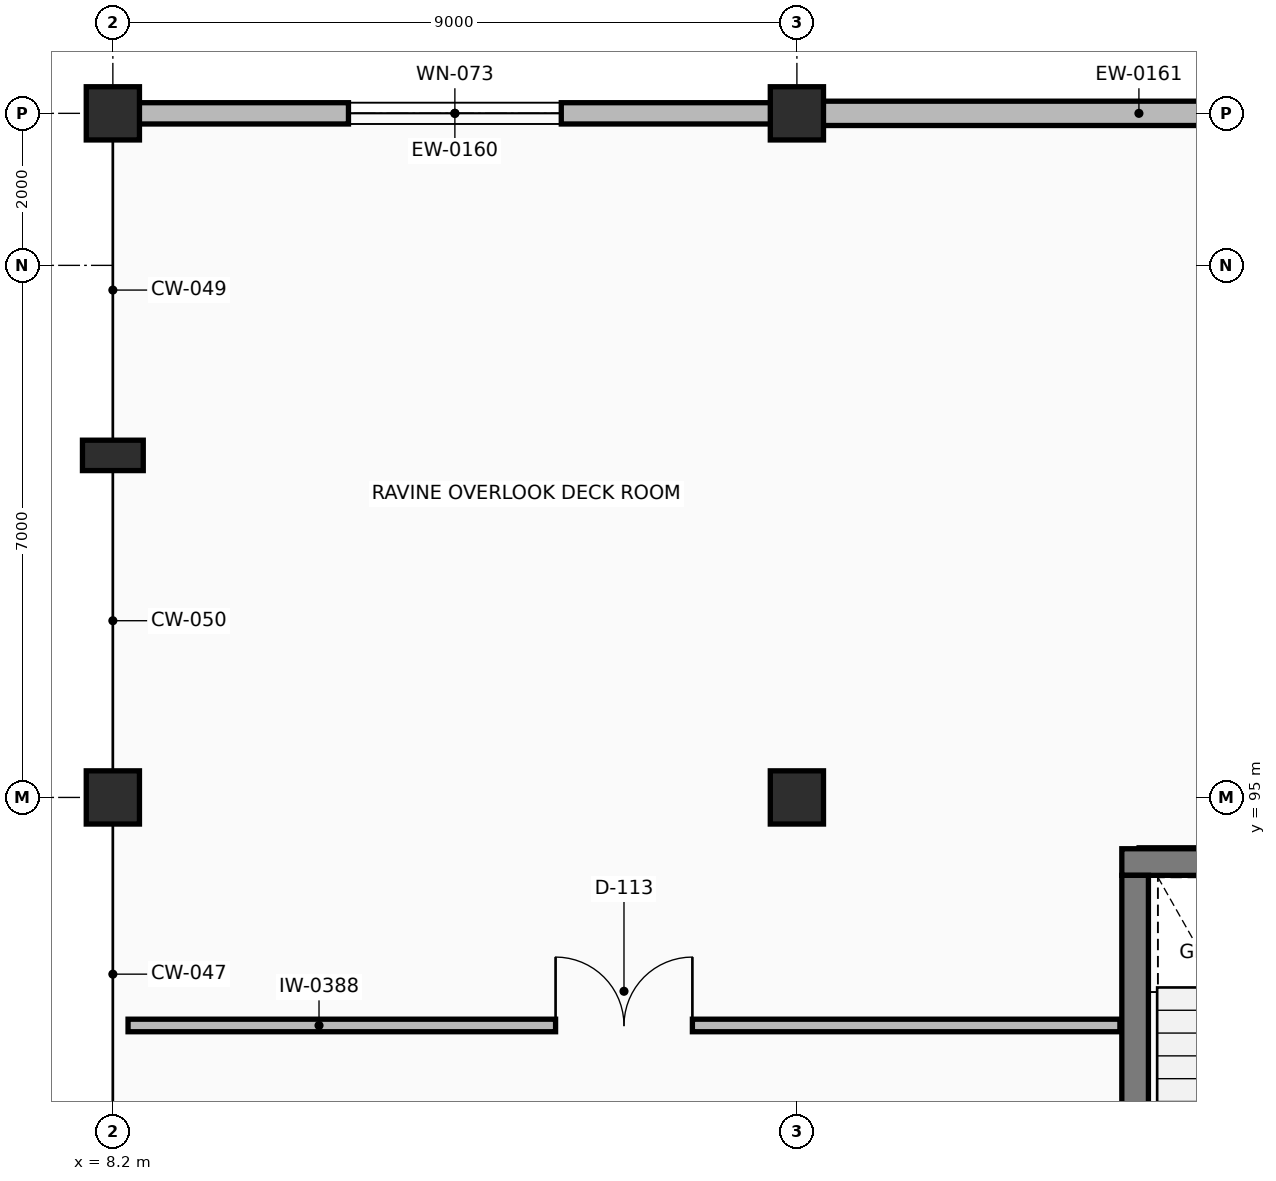
"""IFC4 building model, lengths in metres.
Left out: names, types, materials, properties, quantities, classifications, styles, units other than length and angle.
Written with IfcOpenShell. Run it as: python <this file> out.ifc"""

import sys

from ifc_helpers import new_model, si_unit, direction, frame, frame_2d, origin, origin_2d, place, context, subcontext, project, spatial, rectangle, extrude, element, fill, save


model = new_model("IFC4")
c1 = context("Model", 3, precision=1e-05, world=origin(), true_north=direction((0.0, 1.0)))
c2 = subcontext(c1, "Body", "Model", "MODEL_VIEW")
j1 = project(units=[si_unit("LENGTHUNIT", "METRE"), si_unit("PLANEANGLEUNIT", "RADIAN")], contexts=[c1])
p1 = place(None, origin())
s1 = spatial("IfcSite", under=j1, at=p1, CompositionType="ELEMENT")
p2 = place(p1, origin())
s2 = spatial("IfcBuilding", under=s1, at=p2, CompositionType="ELEMENT")
p3 = place(p2, frame((0.0, 0.0, 9.6)))
s3 = spatial("IfcBuildingStorey", under=s2, at=p3, CompositionType="ELEMENT", Elevation=9.6)
for number, where, z_axis, x_axis in (
    (1, (8.2, 95.0, 0.0), (0.0, 0.0, 1.0), (1.0, 0.0, 0.0)),
    (2, (8.2, 104.0, 0.0), (0.0, 0.0, 1.0), (1.0, 0.0, 0.0)),
    (3, (17.2, 95.0, 0.0), (0.0, 0.0, 1.0), (1.0, 0.0, 0.0)),
    (4, (17.2, 104.0, 0.0), (0.0, 0.0, 1.0), (1.0, 0.0, 0.0)),
):
    element("IfcColumn", number, at=place(p3, frame(where, z_axis=z_axis, x_axis=x_axis)), inside=s3, PredefinedType="COLUMN", context=c2, shape_type="SweptSolid", body=[
        extrude(rectangle(XDim=0.7, YDim=0.7, at=origin_2d()), origin(), (0.0, 0.0, 1.0), 4.8),
    ])
p4 = place(p3, frame((8.2, 99.5, 0.0), z_axis=(0.0, 0.0, 1.0), x_axis=(0.0, 1.0, 0.0)))
e5 = element("IfcColumn", 5, at=p4, inside=s3, PredefinedType="PILASTER", context=c2, shape_type="SweptSolid", body=[
    extrude(rectangle(XDim=0.4, YDim=0.8, at=origin_2d()), origin(), (0.0, 0.0, 1.0), 4.8),
])
p5 = place(p3, frame((16.855, 104.0, 0.0), z_axis=(0.0, 0.0, 1.0), x_axis=(-1.0, 0.0, 0.0)))
e6 = element("IfcWall", 6, at=p5, inside=s3, PredefinedType="SOLIDWALL", context=c2, shape_type="SweptSolid", body=[
    extrude(rectangle(XDim=8.31, YDim=0.28, at=frame_2d((4.155, 0.0))), origin(), (0.0, 0.0, 1.0), 3.614),
])
p6 = place(p5, frame((2.755, 0.0, 0.9)))
e7 = element("IfcOpeningElement", 7, at=p6, cuts=e6, PredefinedType="OPENING", context=c2, shape_type="SweptSolid", body=[
    extrude(rectangle(XDim=2.8, YDim=1.4, at=frame_2d((1.4, 0.7))), frame((0.0, 0.15, 0.0), z_axis=(0.0, -1.0, 0.0), x_axis=(1.0, 0.0, 0.0)), (0.0, 0.0, 1.0), 0.3),
])
p7 = place(p3, frame((25.855, 104.0, 0.0), z_axis=(0.0, 0.0, 1.0), x_axis=(-1.0, 0.0, 0.0)))
e8 = element("IfcWall", 8, at=p7, inside=s3, PredefinedType="SOLIDWALL", context=c2, shape_type="SweptSolid", body=[
    extrude(rectangle(XDim=8.31, YDim=0.32, at=frame_2d((4.155, 0.0))), origin(), (0.0, 0.0, 1.0), 3.614),
])
p8 = place(p3, frame((25.725, 94.15, 0.0), z_axis=(0.0, 0.0, 1.0), x_axis=(-1.0, 0.0, 0.0)))
e9 = element("IfcWall", 9, at=p8, inside=s3, PredefinedType="SHEAR", context=c2, shape_type="SweptSolid", body=[
    extrude(rectangle(XDim=4.25, YDim=0.35, at=frame_2d((2.125, 0.0))), origin(), (0.0, 0.0, 1.0), 4.49),
])
p9 = place(p3, frame((21.65, 93.975, 0.0), z_axis=(0.0, 0.0, 1.0), x_axis=(0.0, -1.0, 0.0)))
e10 = element("IfcWall", 10, at=p9, inside=s3, PredefinedType="SHEAR", context=c2, shape_type="SweptSolid", body=[
    extrude(rectangle(XDim=7.55, YDim=0.35, at=frame_2d((3.775, 0.0))), origin(), (0.0, 0.0, 1.0), 4.49),
])
p10 = place(p9, frame((6.0, 0.0, 0.0)))
e11 = element("IfcOpeningElement", 11, at=p10, cuts=e10, PredefinedType="OPENING", context=c2, shape_type="SweptSolid", body=[
    extrude(rectangle(XDim=1.1, YDim=2.2, at=frame_2d((0.55, 1.1))), frame((0.0, 0.185, 0.0), z_axis=(0.0, -1.0, 0.0), x_axis=(1.0, 0.0, 0.0)), (0.0, 0.0, 1.0), 0.37),
])
p11 = place(p3, frame((8.4, 92.0, 0.0), z_axis=(0.0, 0.0, 1.0), x_axis=(1.0, 0.0, 0.0)))
e12 = element("IfcWall", 12, at=p11, inside=s3, PredefinedType="PARTITIONING", context=c2, shape_type="SweptSolid", body=[
    extrude(rectangle(XDim=13.05, YDim=0.165, at=frame_2d((6.525, 0.0))), origin(), (0.0, 0.0, 1.0), 3.762),
])
p12 = place(p11, frame((5.625, 0.0, 0.0)))
e13 = element("IfcOpeningElement", 13, at=p12, cuts=e12, PredefinedType="OPENING", context=c2, shape_type="SweptSolid", body=[
    extrude(rectangle(XDim=1.8, YDim=2.3, at=frame_2d((0.9, 1.15))), frame((0.0, 0.093, 0.0), z_axis=(0.0, -1.0, 0.0), x_axis=(1.0, 0.0, 0.0)), (0.0, 0.0, 1.0), 0.185),
])
p13 = place(p6, origin())
e14 = element("IfcWindow", 14, at=p13, inside=s3, PartitioningType="SINGLE_PANEL", PredefinedType="WINDOW", context=c2, shape_type="SweptSolid", body=[
    extrude(rectangle(XDim=2.8, YDim=1.4, at=frame_2d((1.4, 0.7))), frame((0.0, 0.03, 0.0), z_axis=(0.0, -1.0, 0.0), x_axis=(1.0, 0.0, 0.0)), (0.0, 0.0, 1.0), 0.06),
])
fill(e7, e14)
p14 = place(p12, origin())
e15 = element("IfcDoor", 15, at=p14, inside=s3, OperationType="DOUBLE_SWING_RIGHT", PredefinedType="DOOR", context=c2, shape_type="SweptSolid", body=[
    extrude(rectangle(XDim=1.8, YDim=2.3, at=frame_2d((0.9, 1.15))), frame((0.0, 0.025, 0.0), z_axis=(0.0, -1.0, 0.0), x_axis=(1.0, 0.0, 0.0)), (0.0, 0.0, 1.0), 0.05),
])
fill(e13, e15)
save(model, sys.argv[1])
